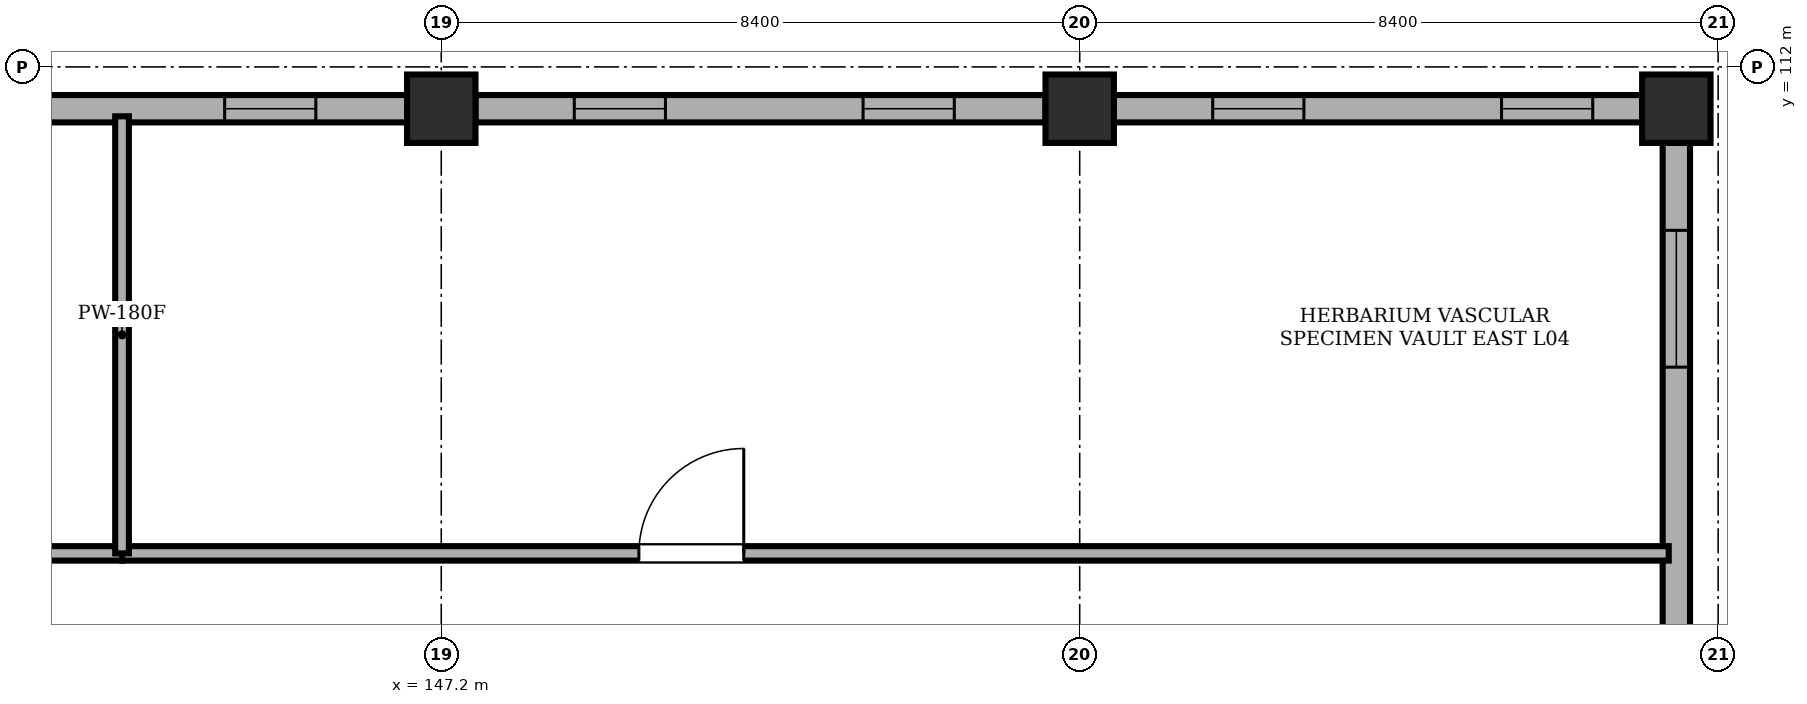
"""IFC4 building model, lengths in metres.
Left out: names, types, materials, properties, quantities, classifications, styles, units other than length and angle.
Written with IfcOpenShell. Run it as: python <this file> out.ifc"""

import sys

from ifc_helpers import new_model, si_unit, direction, frame, frame_2d, origin, origin_2d, place, context, subcontext, project, spatial, rectangle, extrude, element, fill, save


model = new_model("IFC4")
c1 = context("Model", 3, precision=1e-05, world=origin(), true_north=direction((0.0, 1.0)))
c2 = subcontext(c1, "Body", "Model", "MODEL_VIEW")
j1 = project(units=[si_unit("LENGTHUNIT", "METRE"), si_unit("PLANEANGLEUNIT", "RADIAN")], contexts=[c1])
p1 = place(None, origin())
s1 = spatial("IfcSite", under=j1, at=p1, CompositionType="ELEMENT")
p2 = place(p1, origin())
s2 = spatial("IfcBuilding", under=s1, at=p2, CompositionType="ELEMENT")
p3 = place(p2, frame((0.0, 0.0, 14.7)))
s3 = spatial("IfcBuildingStorey", under=s2, at=p3, CompositionType="ELEMENT", Elevation=14.7)
for number, where, z_axis, x_axis in (
    (1, (147.2, 111.45, 0.0), (0.0, 0.0, 1.0), (1.0, 0.0, 0.0)),
    (2, (155.6, 111.45, 0.0), (0.0, 0.0, 1.0), (1.0, 0.0, 0.0)),
    (3, (163.45, 111.45, 0.0), (0.0, 0.0, 1.0), (1.0, 0.0, 0.0)),
):
    element("IfcColumn", number, at=place(p3, frame(where, z_axis=z_axis, x_axis=x_axis)), inside=s3, PredefinedType="COLUMN", context=c2, shape_type="SweptSolid", body=[
        extrude(rectangle(XDim=0.9, YDim=0.9, at=origin_2d()), origin(), (0.0, 0.0, 1.0), 4.26),
    ])
p4 = place(p3, frame((139.25, 111.45, 0.0), z_axis=(0.0, 0.0, 1.0), x_axis=(1.0, 0.0, 0.0)))
e4 = element("IfcWall", 4, at=p4, inside=s3, PredefinedType="STANDARD", context=c2, shape_type="SweptSolid", body=[
    extrude(rectangle(XDim=7.5, YDim=0.36, at=frame_2d((3.75, 0.0))), origin(), (0.0, 0.0, 1.0), 3.56),
])
p5 = place(p4, frame((1.3, 0.0, 1.1)))
e5 = element("IfcOpeningElement", 5, at=p5, cuts=e4, PredefinedType="OPENING", context=c2, shape_type="SweptSolid", body=[
    extrude(rectangle(XDim=1.2, YDim=1.8, at=frame_2d((0.6, 0.9))), frame((0.0, 0.19, 0.0), z_axis=(0.0, -1.0, 0.0), x_axis=(1.0, 0.0, 0.0)), (0.0, 0.0, 1.0), 0.38),
])
p6 = place(p4, frame((5.1, 0.0, 1.1)))
e6 = element("IfcOpeningElement", 6, at=p6, cuts=e4, PredefinedType="OPENING", context=c2, shape_type="SweptSolid", body=[
    extrude(rectangle(XDim=1.2, YDim=1.8, at=frame_2d((0.6, 0.9))), frame((0.0, 0.19, 0.0), z_axis=(0.0, -1.0, 0.0), x_axis=(1.0, 0.0, 0.0)), (0.0, 0.0, 1.0), 0.38),
])
p7 = place(p3, frame((147.65, 111.45, 0.0), z_axis=(0.0, 0.0, 1.0), x_axis=(1.0, 0.0, 0.0)))
e7 = element("IfcWall", 7, at=p7, inside=s3, PredefinedType="STANDARD", context=c2, shape_type="SweptSolid", body=[
    extrude(rectangle(XDim=7.5, YDim=0.36, at=frame_2d((3.75, 0.0))), origin(), (0.0, 0.0, 1.0), 3.56),
])
p8 = place(p7, frame((1.3, 0.0, 1.1)))
e8 = element("IfcOpeningElement", 8, at=p8, cuts=e7, PredefinedType="OPENING", context=c2, shape_type="SweptSolid", body=[
    extrude(rectangle(XDim=1.2, YDim=1.8, at=frame_2d((0.6, 0.9))), frame((0.0, 0.19, 0.0), z_axis=(0.0, -1.0, 0.0), x_axis=(1.0, 0.0, 0.0)), (0.0, 0.0, 1.0), 0.38),
])
p9 = place(p7, frame((5.1, 0.0, 1.1)))
e9 = element("IfcOpeningElement", 9, at=p9, cuts=e7, PredefinedType="OPENING", context=c2, shape_type="SweptSolid", body=[
    extrude(rectangle(XDim=1.2, YDim=1.8, at=frame_2d((0.6, 0.9))), frame((0.0, 0.19, 0.0), z_axis=(0.0, -1.0, 0.0), x_axis=(1.0, 0.0, 0.0)), (0.0, 0.0, 1.0), 0.38),
])
p10 = place(p3, frame((156.05, 111.45, 0.0), z_axis=(0.0, 0.0, 1.0), x_axis=(1.0, 0.0, 0.0)))
e10 = element("IfcWall", 10, at=p10, inside=s3, PredefinedType="STANDARD", context=c2, shape_type="SweptSolid", body=[
    extrude(rectangle(XDim=6.95, YDim=0.36, at=frame_2d((3.475, 0.0))), origin(), (0.0, 0.0, 1.0), 3.56),
])
p11 = place(p10, frame((1.3, 0.0, 1.1)))
e11 = element("IfcOpeningElement", 11, at=p11, cuts=e10, PredefinedType="OPENING", context=c2, shape_type="SweptSolid", body=[
    extrude(rectangle(XDim=1.2, YDim=1.8, at=frame_2d((0.6, 0.9))), frame((0.0, 0.19, 0.0), z_axis=(0.0, -1.0, 0.0), x_axis=(1.0, 0.0, 0.0)), (0.0, 0.0, 1.0), 0.38),
])
p12 = place(p10, frame((5.1, 0.0, 1.1)))
e12 = element("IfcOpeningElement", 12, at=p12, cuts=e10, PredefinedType="OPENING", context=c2, shape_type="SweptSolid", body=[
    extrude(rectangle(XDim=1.2, YDim=1.8, at=frame_2d((0.6, 0.9))), frame((0.0, 0.19, 0.0), z_axis=(0.0, -1.0, 0.0), x_axis=(1.0, 0.0, 0.0)), (0.0, 0.0, 1.0), 0.38),
])
p13 = place(p3, frame((163.45, 111.0, 0.0), z_axis=(0.0, 0.0, 1.0), x_axis=(0.0, -1.0, 0.0)))
e13 = element("IfcWall", 13, at=p13, inside=s3, PredefinedType="STANDARD", context=c2, shape_type="SweptSolid", body=[
    extrude(rectangle(XDim=6.95, YDim=0.36, at=frame_2d((3.475, 0.0))), origin(), (0.0, 0.0, 1.0), 3.56),
])
p14 = place(p13, frame((1.15, 0.0, 1.1)))
e14 = element("IfcOpeningElement", 14, at=p14, cuts=e13, PredefinedType="OPENING", context=c2, shape_type="SweptSolid", body=[
    extrude(rectangle(XDim=1.8, YDim=1.8, at=frame_2d((0.9, 0.9))), frame((0.0, 0.19, 0.0), z_axis=(0.0, -1.0, 0.0), x_axis=(1.0, 0.0, 0.0)), (0.0, 0.0, 1.0), 0.38),
])
p15 = place(p3, frame((122.15, 105.6, 0.0), z_axis=(0.0, 0.0, 1.0), x_axis=(1.0, 0.0, 0.0)))
e15 = element("IfcWall", 15, at=p15, inside=s3, PredefinedType="SOLIDWALL", context=c2, shape_type="SweptSolid", body=[
    extrude(rectangle(XDim=20.85, YDim=0.19, at=frame_2d((10.425, 0.0))), origin(), (0.0, 0.0, 1.0), 4.26),
])
p16 = place(p15, frame((3.75, 0.0, 0.0)))
e16 = element("IfcOpeningElement", 16, at=p16, cuts=e15, PredefinedType="OPENING", context=c2, shape_type="SweptSolid", body=[
    extrude(rectangle(XDim=1.38, YDim=2.22, at=frame_2d((0.69, 1.11))), frame((0.0, 0.105, 0.0), z_axis=(0.0, -1.0, 0.0), x_axis=(1.0, 0.0, 0.0)), (0.0, 0.0, 1.0), 0.21),
])
p17 = place(p3, frame((143.0, 105.6, 0.0), z_axis=(0.0, 0.0, 1.0), x_axis=(1.0, 0.0, 0.0)))
e17 = element("IfcWall", 17, at=p17, inside=s3, PredefinedType="SOLIDWALL", context=c2, shape_type="SweptSolid", body=[
    extrude(rectangle(XDim=20.35, YDim=0.19, at=frame_2d((10.175, 0.0))), origin(), (0.0, 0.0, 1.0), 4.26),
])
p18 = place(p17, frame((6.8, 0.0, 0.0)))
e18 = element("IfcOpeningElement", 18, at=p18, cuts=e17, PredefinedType="OPENING", context=c2, shape_type="SweptSolid", body=[
    extrude(rectangle(XDim=1.38, YDim=2.22, at=frame_2d((0.69, 1.11))), frame((0.0, 0.105, 0.0), z_axis=(0.0, -1.0, 0.0), x_axis=(1.0, 0.0, 0.0)), (0.0, 0.0, 1.0), 0.21),
])
p19 = place(p3, frame((143.0, 105.6, 0.0), z_axis=(0.0, 0.0, 1.0), x_axis=(0.0, 1.0, 0.0)))
e19 = element("IfcWall", 19, at=p19, inside=s3, PredefinedType="STANDARD", context=c2, shape_type="SweptSolid", body=[
    extrude(rectangle(XDim=5.75, YDim=0.18, at=frame_2d((2.875, 0.0))), origin(), (0.0, 0.0, 1.0), 3.76),
])
p20 = place(p6, origin())
e20 = element("IfcWindow", 20, at=p20, inside=s3, PartitioningType="SINGLE_PANEL", PredefinedType="WINDOW", context=c2, shape_type="SweptSolid", body=[
    extrude(rectangle(XDim=1.2, YDim=1.8, at=frame_2d((0.6, 0.9))), frame((0.0, 0.03, 0.0), z_axis=(0.0, -1.0, 0.0), x_axis=(1.0, 0.0, 0.0)), (0.0, 0.0, 1.0), 0.06),
])
fill(e6, e20)
p21 = place(p8, origin())
e21 = element("IfcWindow", 21, at=p21, inside=s3, PartitioningType="SINGLE_PANEL", PredefinedType="WINDOW", context=c2, shape_type="SweptSolid", body=[
    extrude(rectangle(XDim=1.2, YDim=1.8, at=frame_2d((0.6, 0.9))), frame((0.0, 0.03, 0.0), z_axis=(0.0, -1.0, 0.0), x_axis=(1.0, 0.0, 0.0)), (0.0, 0.0, 1.0), 0.06),
])
fill(e8, e21)
p22 = place(p9, origin())
e22 = element("IfcWindow", 22, at=p22, inside=s3, PartitioningType="SINGLE_PANEL", PredefinedType="WINDOW", context=c2, shape_type="SweptSolid", body=[
    extrude(rectangle(XDim=1.2, YDim=1.8, at=frame_2d((0.6, 0.9))), frame((0.0, 0.03, 0.0), z_axis=(0.0, -1.0, 0.0), x_axis=(1.0, 0.0, 0.0)), (0.0, 0.0, 1.0), 0.06),
])
fill(e9, e22)
p23 = place(p11, origin())
e23 = element("IfcWindow", 23, at=p23, inside=s3, PartitioningType="SINGLE_PANEL", PredefinedType="WINDOW", context=c2, shape_type="SweptSolid", body=[
    extrude(rectangle(XDim=1.2, YDim=1.8, at=frame_2d((0.6, 0.9))), frame((0.0, 0.03, 0.0), z_axis=(0.0, -1.0, 0.0), x_axis=(1.0, 0.0, 0.0)), (0.0, 0.0, 1.0), 0.06),
])
fill(e11, e23)
p24 = place(p12, origin())
e24 = element("IfcWindow", 24, at=p24, inside=s3, PartitioningType="SINGLE_PANEL", PredefinedType="WINDOW", context=c2, shape_type="SweptSolid", body=[
    extrude(rectangle(XDim=1.2, YDim=1.8, at=frame_2d((0.6, 0.9))), frame((0.0, 0.03, 0.0), z_axis=(0.0, -1.0, 0.0), x_axis=(1.0, 0.0, 0.0)), (0.0, 0.0, 1.0), 0.06),
])
fill(e12, e24)
p25 = place(p14, origin())
e25 = element("IfcWindow", 25, at=p25, inside=s3, PartitioningType="DOUBLE_PANEL_VERTICAL", PredefinedType="WINDOW", context=c2, shape_type="SweptSolid", body=[
    extrude(rectangle(XDim=1.8, YDim=1.8, at=frame_2d((0.9, 0.9))), frame((0.0, 0.03, 0.0), z_axis=(0.0, -1.0, 0.0), x_axis=(1.0, 0.0, 0.0)), (0.0, 0.0, 1.0), 0.06),
])
fill(e14, e25)
p26 = place(p18, origin())
e26 = element("IfcDoor", 26, at=p26, inside=s3, OperationType="SINGLE_SWING_RIGHT", PredefinedType="DOOR", context=c2, shape_type="SweptSolid", body=[
    extrude(rectangle(XDim=1.38, YDim=2.22, at=frame_2d((0.69, 1.11))), frame((0.0, 0.025, 0.0), z_axis=(0.0, -1.0, 0.0), x_axis=(1.0, 0.0, 0.0)), (0.0, 0.0, 1.0), 0.05),
])
fill(e18, e26)
save(model, sys.argv[1])
